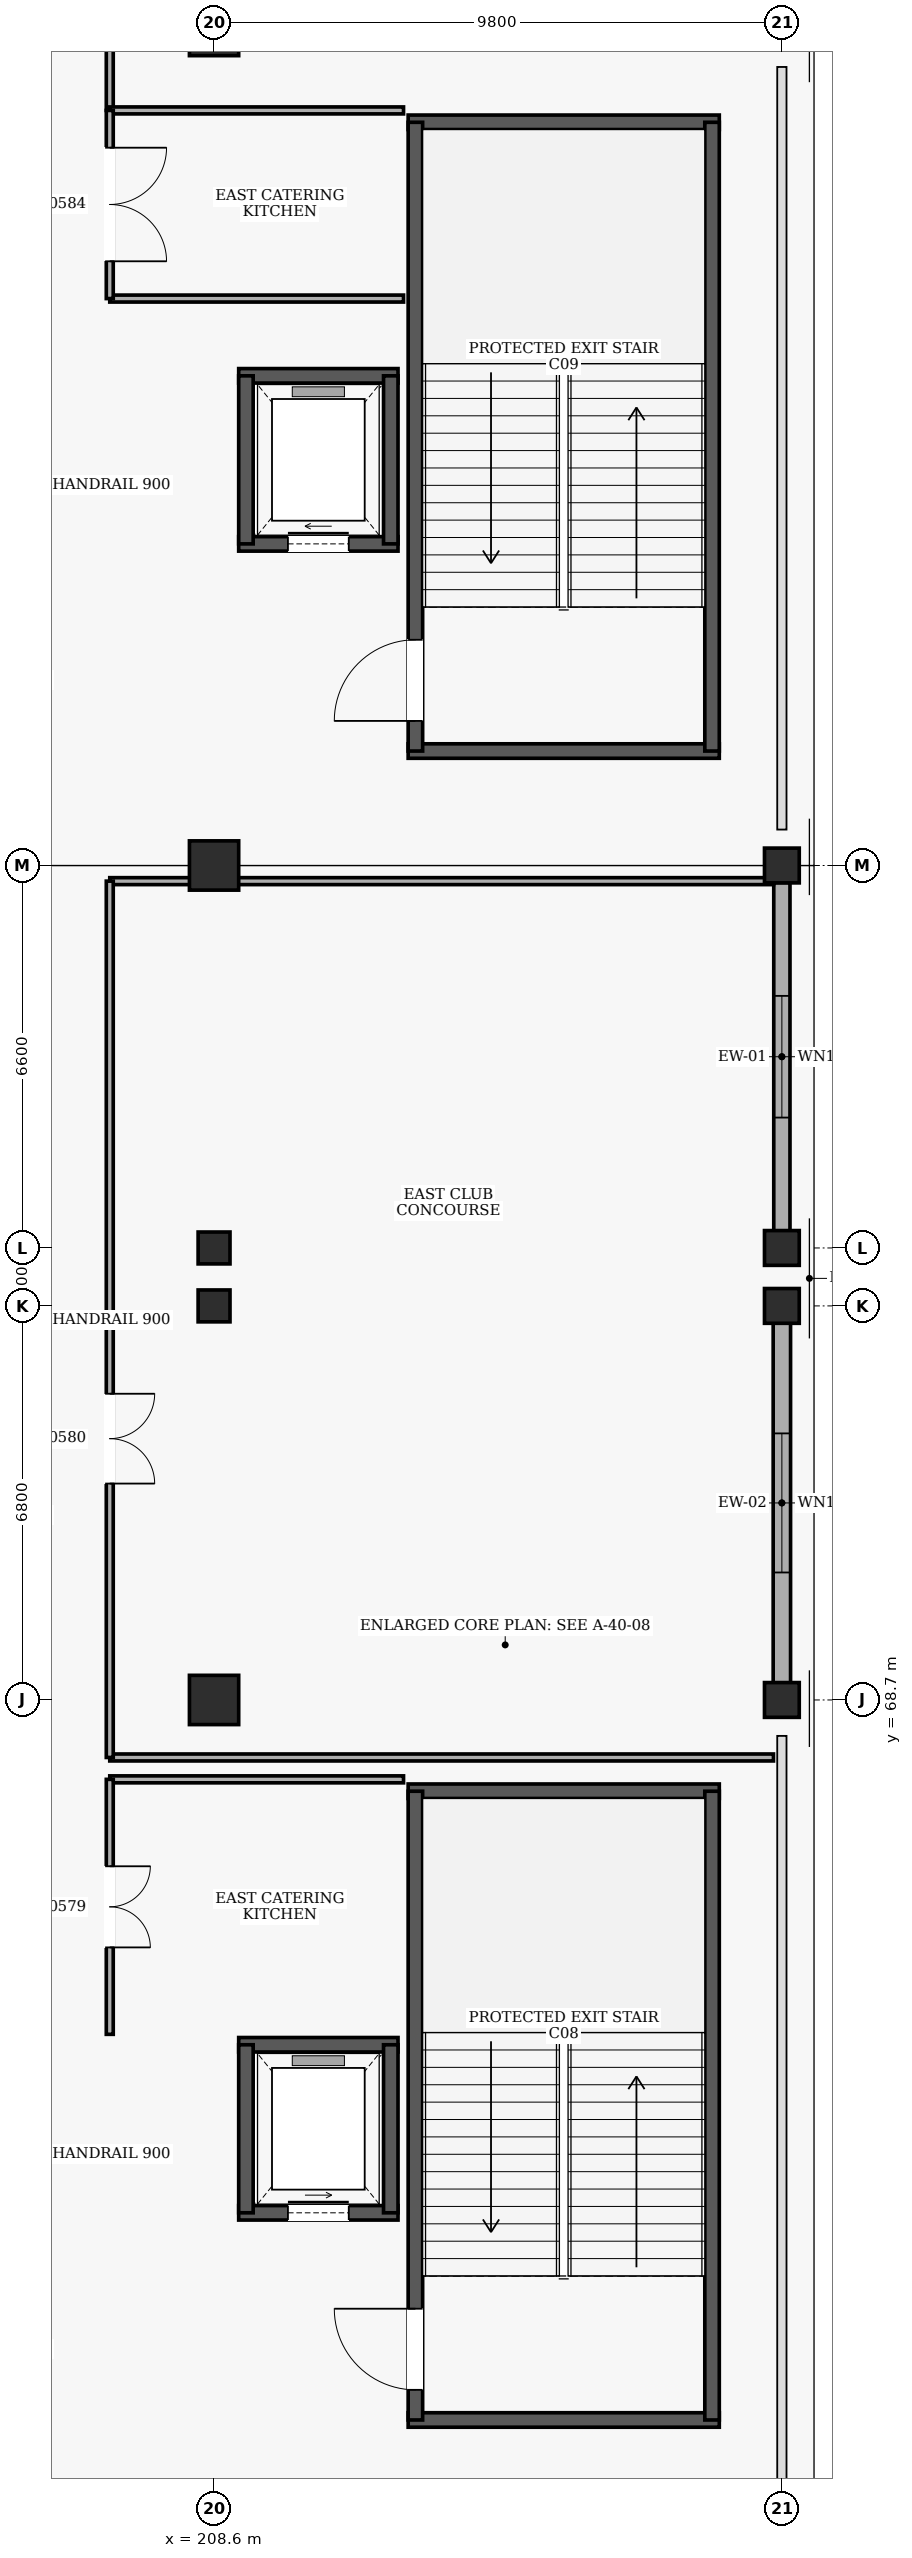
"""IFC4 building model, lengths in metres.
Left out: names, types, materials, properties, quantities, classifications, styles, units other than length and angle.
Written with IfcOpenShell. Run it as: python <this file> out.ifc"""

import sys

from ifc_helpers import new_model, si_unit, direction, frame, frame_2d, origin, origin_2d, place, context, subcontext, project, spatial, rectangle, extrude, element, fill, save


model = new_model("IFC4")
c1 = context("Model", 3, precision=1e-05, world=origin(), true_north=direction((0.0, 1.0)))
c2 = subcontext(c1, "Body", "Model", "MODEL_VIEW")
j1 = project(units=[si_unit("LENGTHUNIT", "METRE"), si_unit("PLANEANGLEUNIT", "RADIAN")], contexts=[c1])
p1 = place(None, origin())
s1 = spatial("IfcSite", under=j1, at=p1, CompositionType="ELEMENT")
p2 = place(p1, origin())
s2 = spatial("IfcBuilding", under=s1, at=p2, CompositionType="ELEMENT")
p3 = place(p2, frame((0.0, 0.0, 10.2)))
s3 = spatial("IfcBuildingStorey", under=s2, at=p3, CompositionType="ELEMENT", Elevation=10.2)
p4 = place(p3, frame((208.6, 68.7, 0.0), z_axis=(0.0, 0.0, 1.0), x_axis=(1.0, 0.0, 0.0)))
e1 = element("IfcColumn", 1, at=p4, inside=s3, PredefinedType="COLUMN", context=c2, shape_type="SweptSolid", body=[
    extrude(rectangle(XDim=0.85, YDim=0.85, at=origin_2d()), origin(), (0.0, 0.0, 1.0), 4.8),
])
for number, where, z_axis, x_axis in (
    (2, (208.6, 75.5, 0.0), (0.0, 0.0, 1.0), (1.0, 0.0, 0.0)),
    (3, (208.6, 76.5, 0.0), (0.0, 0.0, 1.0), (1.0, 0.0, 0.0)),
):
    element("IfcColumn", number, at=place(p3, frame(where, z_axis=z_axis, x_axis=x_axis)), inside=s3, PredefinedType="COLUMN", context=c2, shape_type="SweptSolid", body=[
        extrude(rectangle(XDim=0.55, YDim=0.55, at=origin_2d()), origin(), (0.0, 0.0, 1.0), 4.8),
    ])
for number, where, z_axis, x_axis in (
    (4, (208.6, 83.1, 0.0), (0.0, 0.0, 1.0), (1.0, 0.0, 0.0)),
    (5, (208.6, 97.5, 0.0), (0.0, 0.0, 1.0), (1.0, 0.0, 0.0)),
):
    element("IfcColumn", number, at=place(p3, frame(where, z_axis=z_axis, x_axis=x_axis)), inside=s3, PredefinedType="COLUMN", context=c2, shape_type="SweptSolid", body=[
        extrude(rectangle(XDim=0.85, YDim=0.85, at=origin_2d()), origin(), (0.0, 0.0, 1.0), 4.8),
    ])
for number, where, z_axis, x_axis in (
    (6, (218.4, 68.7, 0.0), (0.0, 0.0, 1.0), (1.0, 0.0, 0.0)),
    (7, (218.4, 75.5, 0.0), (0.0, 0.0, 1.0), (1.0, 0.0, 0.0)),
    (8, (218.4, 76.5, 0.0), (0.0, 0.0, 1.0), (1.0, 0.0, 0.0)),
    (9, (218.4, 83.1, 0.0), (0.0, 0.0, 1.0), (1.0, 0.0, 0.0)),
):
    element("IfcColumn", number, at=place(p3, frame(where, z_axis=z_axis, x_axis=x_axis)), inside=s3, PredefinedType="COLUMN", context=c2, shape_type="SweptSolid", body=[
        extrude(rectangle(XDim=0.6, YDim=0.6, at=origin_2d()), origin(), (0.0, 0.0, 1.0), 4.8),
    ])
p5 = place(p3, frame((218.4, 82.805, 0.0), z_axis=(0.0, 0.0, 1.0), x_axis=(0.0, -1.0, 0.0)))
e10 = element("IfcWall", 10, at=p5, inside=s3, PredefinedType="SOLIDWALL", context=c2, shape_type="SweptSolid", body=[
    extrude(rectangle(XDim=6.01, YDim=0.28, at=frame_2d((3.005, 0.0))), origin(), (0.0, 0.0, 1.0), 3.96),
])
p6 = place(p5, frame((1.955, 0.0, 0.9)))
e11 = element("IfcOpeningElement", 11, at=p6, cuts=e10, PredefinedType="OPENING", context=c2, shape_type="SweptSolid", body=[
    extrude(rectangle(XDim=2.1, YDim=1.8, at=frame_2d((1.05, 0.9))), frame((0.0, 0.15, 0.0), z_axis=(0.0, -1.0, 0.0), x_axis=(1.0, 0.0, 0.0)), (0.0, 0.0, 1.0), 0.3),
])
p7 = place(p3, frame((218.4, 75.205, 0.0), z_axis=(0.0, 0.0, 1.0), x_axis=(0.0, -1.0, 0.0)))
e12 = element("IfcWall", 12, at=p7, inside=s3, PredefinedType="SOLIDWALL", context=c2, shape_type="SweptSolid", body=[
    extrude(rectangle(XDim=6.21, YDim=0.3, at=frame_2d((3.105, 0.0))), origin(), (0.0, 0.0, 1.0), 3.86),
])
p8 = place(p7, frame((1.905, 0.0, 0.9)))
e13 = element("IfcOpeningElement", 13, at=p8, cuts=e12, PredefinedType="OPENING", context=c2, shape_type="SweptSolid", body=[
    extrude(rectangle(XDim=2.4, YDim=1.8, at=frame_2d((1.2, 0.9))), frame((0.0, 0.16, 0.0), z_axis=(0.0, -1.0, 0.0), x_axis=(1.0, 0.0, 0.0)), (0.0, 0.0, 1.0), 0.32),
])
for number, where, z_axis, x_axis in (
    (14, (211.95, 56.275, 0.0), (0.0, 0.0, 1.0), (1.0, 0.0, 0.0)),
    (15, (217.32, 67.125, 0.0), (0.0, 0.0, 1.0), (-1.0, 0.0, 0.0)),
):
    element("IfcWall", number, at=place(p3, frame(where, z_axis=z_axis, x_axis=x_axis)), inside=s3, PredefinedType="SHEAR", context=c2, shape_type="SweptSolid", body=[
        extrude(rectangle(XDim=5.37, YDim=0.25, at=frame_2d((2.685, 0.0))), origin(), (0.0, 0.0, 1.0), 4.48),
    ])
p9 = place(p3, frame((212.075, 56.275, 0.0), z_axis=(0.0, 0.0, 1.0), x_axis=(0.0, 1.0, 0.0)))
e16 = element("IfcWall", 16, at=p9, inside=s3, PredefinedType="SHEAR", context=c2, shape_type="SweptSolid", body=[
    extrude(rectangle(XDim=10.85, YDim=0.25, at=frame_2d((5.425, 0.0))), origin(), (0.0, 0.0, 1.0), 4.48),
])
p10 = place(p9, frame((0.52, 0.0, 0.0)))
e17 = element("IfcOpeningElement", 17, at=p10, cuts=e16, PredefinedType="OPENING", context=c2, shape_type="SweptSolid", body=[
    extrude(rectangle(XDim=1.4, YDim=2.15, at=frame_2d((0.7, 1.075))), frame((0.0, 0.135, 0.0), z_axis=(0.0, -1.0, 0.0), x_axis=(1.0, 0.0, 0.0)), (0.0, 0.0, 1.0), 0.27),
])
p11 = place(p3, frame((217.195, 56.275, 0.0), z_axis=(0.0, 0.0, 1.0), x_axis=(0.0, 1.0, 0.0)))
e18 = element("IfcWall", 18, at=p11, inside=s3, PredefinedType="SHEAR", context=c2, shape_type="SweptSolid", body=[
    extrude(rectangle(XDim=10.85, YDim=0.25, at=frame_2d((5.425, 0.0))), origin(), (0.0, 0.0, 1.0), 4.48),
])
for number, where, z_axis, x_axis in (
    (19, (211.95, 85.075, 0.0), (0.0, 0.0, 1.0), (1.0, 0.0, 0.0)),
    (20, (217.32, 95.925, 0.0), (0.0, 0.0, 1.0), (-1.0, 0.0, 0.0)),
):
    element("IfcWall", number, at=place(p3, frame(where, z_axis=z_axis, x_axis=x_axis)), inside=s3, PredefinedType="SHEAR", context=c2, shape_type="SweptSolid", body=[
        extrude(rectangle(XDim=5.37, YDim=0.25, at=frame_2d((2.685, 0.0))), origin(), (0.0, 0.0, 1.0), 4.48),
    ])
p12 = place(p3, frame((212.075, 85.075, 0.0), z_axis=(0.0, 0.0, 1.0), x_axis=(0.0, 1.0, 0.0)))
e21 = element("IfcWall", 21, at=p12, inside=s3, PredefinedType="SHEAR", context=c2, shape_type="SweptSolid", body=[
    extrude(rectangle(XDim=10.85, YDim=0.25, at=frame_2d((5.425, 0.0))), origin(), (0.0, 0.0, 1.0), 4.48),
])
p13 = place(p12, frame((0.52, 0.0, 0.0)))
e22 = element("IfcOpeningElement", 22, at=p13, cuts=e21, PredefinedType="OPENING", context=c2, shape_type="SweptSolid", body=[
    extrude(rectangle(XDim=1.4, YDim=2.15, at=frame_2d((0.7, 1.075))), frame((0.0, 0.135, 0.0), z_axis=(0.0, -1.0, 0.0), x_axis=(1.0, 0.0, 0.0)), (0.0, 0.0, 1.0), 0.27),
])
p14 = place(p3, frame((217.195, 85.075, 0.0), z_axis=(0.0, 0.0, 1.0), x_axis=(0.0, 1.0, 0.0)))
e23 = element("IfcWall", 23, at=p14, inside=s3, PredefinedType="SHEAR", context=c2, shape_type="SweptSolid", body=[
    extrude(rectangle(XDim=10.85, YDim=0.25, at=frame_2d((5.425, 0.0))), origin(), (0.0, 0.0, 1.0), 4.48),
])
p15 = place(p3, frame((209.025, 59.85, 0.0), z_axis=(0.0, 0.0, 1.0), x_axis=(1.0, 0.0, 0.0)))
e24 = element("IfcWall", 24, at=p15, inside=s3, PredefinedType="SHEAR", context=c2, shape_type="SweptSolid", body=[
    extrude(rectangle(XDim=2.75, YDim=0.25, at=frame_2d((1.375, 0.0))), origin(), (0.0, 0.0, 1.0), 4.48),
])
p16 = place(p15, frame((0.85, 0.0, 0.0)))
e25 = element("IfcOpeningElement", 25, at=p16, cuts=e24, PredefinedType="OPENING", context=c2, shape_type="SweptSolid", body=[
    extrude(rectangle(XDim=1.05, YDim=2.15, at=frame_2d((0.525, 1.075))), frame((0.0, 0.135, 0.0), z_axis=(0.0, -1.0, 0.0), x_axis=(1.0, 0.0, 0.0)), (0.0, 0.0, 1.0), 0.27),
])
p17 = place(p3, frame((211.775, 62.75, 0.0), z_axis=(0.0, 0.0, 1.0), x_axis=(-1.0, 0.0, 0.0)))
e26 = element("IfcWall", 26, at=p17, inside=s3, PredefinedType="SHEAR", context=c2, shape_type="SweptSolid", body=[
    extrude(rectangle(XDim=2.75, YDim=0.25, at=frame_2d((1.375, 0.0))), origin(), (0.0, 0.0, 1.0), 4.48),
])
for number, where, z_axis, x_axis in (
    (27, (209.15, 62.75, 0.0), (0.0, 0.0, 1.0), (0.0, -1.0, 0.0)),
    (28, (211.65, 59.85, 0.0), (0.0, 0.0, 1.0), (0.0, 1.0, 0.0)),
):
    element("IfcWall", number, at=place(p3, frame(where, z_axis=z_axis, x_axis=x_axis)), inside=s3, PredefinedType="SHEAR", context=c2, shape_type="SweptSolid", body=[
        extrude(rectangle(XDim=2.9, YDim=0.25, at=frame_2d((1.45, 0.0))), origin(), (0.0, 0.0, 1.0), 4.48),
    ])
p18 = place(p3, frame((209.025, 88.65, 0.0), z_axis=(0.0, 0.0, 1.0), x_axis=(1.0, 0.0, 0.0)))
e29 = element("IfcWall", 29, at=p18, inside=s3, PredefinedType="SHEAR", context=c2, shape_type="SweptSolid", body=[
    extrude(rectangle(XDim=2.75, YDim=0.25, at=frame_2d((1.375, 0.0))), origin(), (0.0, 0.0, 1.0), 4.48),
])
p19 = place(p18, frame((0.85, 0.0, 0.0)))
e30 = element("IfcOpeningElement", 30, at=p19, cuts=e29, PredefinedType="OPENING", context=c2, shape_type="SweptSolid", body=[
    extrude(rectangle(XDim=1.05, YDim=2.15, at=frame_2d((0.525, 1.075))), frame((0.0, 0.135, 0.0), z_axis=(0.0, -1.0, 0.0), x_axis=(1.0, 0.0, 0.0)), (0.0, 0.0, 1.0), 0.27),
])
p20 = place(p3, frame((211.775, 91.55, 0.0), z_axis=(0.0, 0.0, 1.0), x_axis=(-1.0, 0.0, 0.0)))
e31 = element("IfcWall", 31, at=p20, inside=s3, PredefinedType="SHEAR", context=c2, shape_type="SweptSolid", body=[
    extrude(rectangle(XDim=2.75, YDim=0.25, at=frame_2d((1.375, 0.0))), origin(), (0.0, 0.0, 1.0), 4.48),
])
for number, where, z_axis, x_axis in (
    (32, (209.15, 91.55, 0.0), (0.0, 0.0, 1.0), (0.0, -1.0, 0.0)),
    (33, (211.65, 88.65, 0.0), (0.0, 0.0, 1.0), (0.0, 1.0, 0.0)),
):
    element("IfcWall", number, at=place(p3, frame(where, z_axis=z_axis, x_axis=x_axis)), inside=s3, PredefinedType="SHEAR", context=c2, shape_type="SweptSolid", body=[
        extrude(rectangle(XDim=2.9, YDim=0.25, at=frame_2d((1.45, 0.0))), origin(), (0.0, 0.0, 1.0), 4.48),
    ])
p21 = place(p3, frame((211.87, 67.33, 0.0), z_axis=(0.0, 0.0, 1.0), x_axis=(-1.0, 0.0, 0.0)))
e34 = element("IfcWall", 34, at=p21, inside=s3, PredefinedType="PARTITIONING", context=c2, shape_type="SweptSolid", body=[
    extrude(rectangle(XDim=5.07, YDim=0.12, at=frame_2d((2.535, 0.0))), origin(), (0.0, 0.0, 1.0), 4.48),
])
p22 = place(p3, frame((206.8, 67.33, 0.0), z_axis=(0.0, 0.0, 1.0), x_axis=(0.0, -1.0, 0.0)))
e35 = element("IfcWall", 35, at=p22, inside=s3, PredefinedType="PARTITIONING", context=c2, shape_type="SweptSolid", body=[
    extrude(rectangle(XDim=4.4, YDim=0.12, at=frame_2d((2.2, 0.0))), origin(), (0.0, 0.0, 1.0), 4.48),
])
p23 = place(p22, frame((1.5, 0.0, 0.0)))
e36 = element("IfcOpeningElement", 36, at=p23, cuts=e35, PredefinedType="OPENING", context=c2, shape_type="SweptSolid", body=[
    extrude(rectangle(XDim=1.4, YDim=2.2, at=frame_2d((0.7, 1.1))), frame((0.0, 0.07, 0.0), z_axis=(0.0, -1.0, 0.0), x_axis=(1.0, 0.0, 0.0)), (0.0, 0.0, 1.0), 0.14),
])
p24 = place(p3, frame((206.8, 67.708, 0.0), z_axis=(0.0, 0.0, 1.0), x_axis=(1.0, 0.0, 0.0)))
e37 = element("IfcWall", 37, at=p24, inside=s3, PredefinedType="PARTITIONING", context=c2, shape_type="SweptSolid", body=[
    extrude(rectangle(XDim=11.455, YDim=0.12, at=frame_2d((5.728, 0.0))), origin(), (0.0, 0.0, 1.0), 4.48),
])
p25 = place(p3, frame((218.255, 82.83, 0.0), z_axis=(0.0, 0.0, 1.0), x_axis=(-1.0, 0.0, 0.0)))
e38 = element("IfcWall", 38, at=p25, inside=s3, PredefinedType="PARTITIONING", context=c2, shape_type="SweptSolid", body=[
    extrude(rectangle(XDim=11.455, YDim=0.12, at=frame_2d((5.728, 0.0))), origin(), (0.0, 0.0, 1.0), 3.76),
])
p26 = place(p3, frame((206.8, 82.83, 0.0), z_axis=(0.0, 0.0, 1.0), x_axis=(0.0, -1.0, 0.0)))
e39 = element("IfcWall", 39, at=p26, inside=s3, PredefinedType="PARTITIONING", context=c2, shape_type="SweptSolid", body=[
    extrude(rectangle(XDim=15.123, YDim=0.12, at=frame_2d((7.561, 0.0))), origin(), (0.0, 0.0, 1.0), 4.48),
])
p27 = place(p26, frame((8.846, 0.0, 0.0)))
e40 = element("IfcOpeningElement", 40, at=p27, cuts=e39, PredefinedType="OPENING", context=c2, shape_type="SweptSolid", body=[
    extrude(rectangle(XDim=1.55, YDim=2.2, at=frame_2d((0.775, 1.1))), frame((0.0, 0.07, 0.0), z_axis=(0.0, -1.0, 0.0), x_axis=(1.0, 0.0, 0.0)), (0.0, 0.0, 1.0), 0.14),
])
p28 = place(p3, frame((206.8, 101.817, 0.0), z_axis=(0.0, 0.0, 1.0), x_axis=(0.0, -1.0, 0.0)))
e41 = element("IfcWall", 41, at=p28, inside=s3, PredefinedType="PARTITIONING", context=c2, shape_type="SweptSolid", body=[
    extrude(rectangle(XDim=5.687, YDim=0.12, at=frame_2d((2.843, 0.0))), origin(), (0.0, 0.0, 1.0), 4.48),
])
p29 = place(p28, frame((1.663, 0.0, 0.0)))
e42 = element("IfcOpeningElement", 42, at=p29, cuts=e41, PredefinedType="OPENING", context=c2, shape_type="SweptSolid", body=[
    extrude(rectangle(XDim=1.86, YDim=2.3, at=frame_2d((0.93, 1.15))), frame((0.0, 0.07, 0.0), z_axis=(0.0, -1.0, 0.0), x_axis=(1.0, 0.0, 0.0)), (0.0, 0.0, 1.0), 0.14),
])
for number, where, z_axis, x_axis in (
    (43, (206.8, 92.883, 0.0), (0.0, 0.0, 1.0), (1.0, 0.0, 0.0)),
    (44, (211.87, 96.13, 0.0), (0.0, 0.0, 1.0), (-1.0, 0.0, 0.0)),
):
    element("IfcWall", number, at=place(p3, frame(where, z_axis=z_axis, x_axis=x_axis)), inside=s3, PredefinedType="PARTITIONING", context=c2, shape_type="SweptSolid", body=[
        extrude(rectangle(XDim=5.07, YDim=0.12, at=frame_2d((2.535, 0.0))), origin(), (0.0, 0.0, 1.0), 4.48),
    ])
p30 = place(p3, frame((206.8, 96.13, 0.0), z_axis=(0.0, 0.0, 1.0), x_axis=(0.0, -1.0, 0.0)))
e45 = element("IfcWall", 45, at=p30, inside=s3, PredefinedType="PARTITIONING", context=c2, shape_type="SweptSolid", body=[
    extrude(rectangle(XDim=3.247, YDim=0.12, at=frame_2d((1.623, 0.0))), origin(), (0.0, 0.0, 1.0), 4.48),
])
p31 = place(p30, frame((0.643, 0.0, 0.0)))
e46 = element("IfcOpeningElement", 46, at=p31, cuts=e45, PredefinedType="OPENING", context=c2, shape_type="SweptSolid", body=[
    extrude(rectangle(XDim=1.96, YDim=2.3, at=frame_2d((0.98, 1.15))), frame((0.0, 0.07, 0.0), z_axis=(0.0, -1.0, 0.0), x_axis=(1.0, 0.0, 0.0)), (0.0, 0.0, 1.0), 0.14),
])
p32 = place(p6, origin())
e47 = element("IfcWindow", 47, at=p32, inside=s3, PartitioningType="SINGLE_PANEL", PredefinedType="WINDOW", context=c2, shape_type="SweptSolid", body=[
    extrude(rectangle(XDim=2.1, YDim=1.8, at=frame_2d((1.05, 0.9))), frame((0.0, 0.03, 0.0), z_axis=(0.0, -1.0, 0.0), x_axis=(1.0, 0.0, 0.0)), (0.0, 0.0, 1.0), 0.06),
])
fill(e11, e47)
p33 = place(p8, origin())
e48 = element("IfcWindow", 48, at=p33, inside=s3, PartitioningType="SINGLE_PANEL", PredefinedType="WINDOW", context=c2, shape_type="SweptSolid", body=[
    extrude(rectangle(XDim=2.4, YDim=1.8, at=frame_2d((1.2, 0.9))), frame((0.0, 0.03, 0.0), z_axis=(0.0, -1.0, 0.0), x_axis=(1.0, 0.0, 0.0)), (0.0, 0.0, 1.0), 0.06),
])
fill(e13, e48)
p34 = place(p10, frame((1.4, 0.0, 0.0), z_axis=(0.0, 0.0, 1.0), x_axis=(-1.0, 0.0, 0.0)))
e49 = element("IfcDoor", 49, at=p34, inside=s3, OperationType="SINGLE_SWING_LEFT", PredefinedType="DOOR", context=c2, shape_type="SweptSolid", body=[
    extrude(rectangle(XDim=1.4, YDim=2.15, at=frame_2d((0.7, 1.075))), frame((0.0, 0.025, 0.0), z_axis=(0.0, -1.0, 0.0), x_axis=(1.0, 0.0, 0.0)), (0.0, 0.0, 1.0), 0.05),
])
fill(e17, e49)
p35 = place(p13, frame((1.4, 0.0, 0.0), z_axis=(0.0, 0.0, 1.0), x_axis=(-1.0, 0.0, 0.0)))
e50 = element("IfcDoor", 50, at=p35, inside=s3, OperationType="SINGLE_SWING_RIGHT", PredefinedType="DOOR", context=c2, shape_type="SweptSolid", body=[
    extrude(rectangle(XDim=1.4, YDim=2.15, at=frame_2d((0.7, 1.075))), frame((0.0, 0.025, 0.0), z_axis=(0.0, -1.0, 0.0), x_axis=(1.0, 0.0, 0.0)), (0.0, 0.0, 1.0), 0.05),
])
fill(e22, e50)
p36 = place(p16, origin())
e51 = element("IfcDoor", 51, at=p36, inside=s3, OperationType="SLIDING_TO_LEFT", PredefinedType="DOOR", context=c2, shape_type="SweptSolid", body=[
    extrude(rectangle(XDim=1.05, YDim=2.15, at=frame_2d((0.525, 1.075))), frame((0.0, 0.025, 0.0), z_axis=(0.0, -1.0, 0.0), x_axis=(1.0, 0.0, 0.0)), (0.0, 0.0, 1.0), 0.05),
])
fill(e25, e51)
p37 = place(p19, origin())
e52 = element("IfcDoor", 52, at=p37, inside=s3, OperationType="SLIDING_TO_RIGHT", PredefinedType="DOOR", context=c2, shape_type="SweptSolid", body=[
    extrude(rectangle(XDim=1.05, YDim=2.15, at=frame_2d((0.525, 1.075))), frame((0.0, 0.025, 0.0), z_axis=(0.0, -1.0, 0.0), x_axis=(1.0, 0.0, 0.0)), (0.0, 0.0, 1.0), 0.05),
])
fill(e30, e52)
p38 = place(p23, origin())
e53 = element("IfcDoor", 53, at=p38, inside=s3, OperationType="DOUBLE_DOOR_SINGLE_SWING", PredefinedType="DOOR", context=c2, shape_type="SweptSolid", body=[
    extrude(rectangle(XDim=1.4, YDim=2.2, at=frame_2d((0.7, 1.1))), frame((0.0, 0.025, 0.0), z_axis=(0.0, -1.0, 0.0), x_axis=(1.0, 0.0, 0.0)), (0.0, 0.0, 1.0), 0.05),
])
fill(e36, e53)
p39 = place(p27, origin())
e54 = element("IfcDoor", 54, at=p39, inside=s3, OperationType="DOUBLE_DOOR_SINGLE_SWING", PredefinedType="DOOR", context=c2, shape_type="SweptSolid", body=[
    extrude(rectangle(XDim=1.55, YDim=2.2, at=frame_2d((0.775, 1.1))), frame((0.0, 0.025, 0.0), z_axis=(0.0, -1.0, 0.0), x_axis=(1.0, 0.0, 0.0)), (0.0, 0.0, 1.0), 0.05),
])
fill(e40, e54)
p40 = place(p31, origin())
e55 = element("IfcDoor", 55, at=p40, inside=s3, OperationType="DOUBLE_DOOR_SINGLE_SWING", PredefinedType="DOOR", context=c2, shape_type="SweptSolid", body=[
    extrude(rectangle(XDim=1.96, YDim=2.3, at=frame_2d((0.98, 1.15))), frame((0.0, 0.025, 0.0), z_axis=(0.0, -1.0, 0.0), x_axis=(1.0, 0.0, 0.0)), (0.0, 0.0, 1.0), 0.05),
])
fill(e46, e55)
save(model, sys.argv[1])
